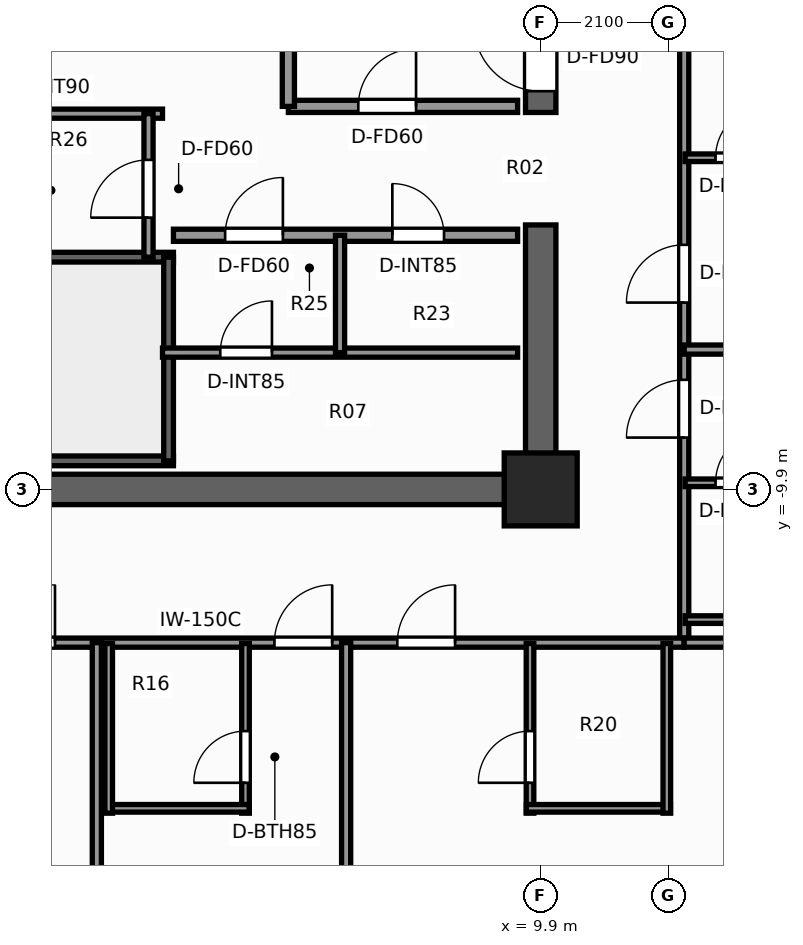
"""IFC4 building model, lengths in metres.
Left out: names, types, materials, properties, quantities, classifications, styles, units other than length and angle.
Written with IfcOpenShell. Run it as: python <this file> out.ifc"""

import sys

from ifc_helpers import new_model, si_unit, direction, frame, frame_2d, origin, origin_2d, place, context, subcontext, project, spatial, rectangle, extrude, element, fill, save


model = new_model("IFC4")
c1 = context("Model", 3, precision=1e-05, world=origin(), true_north=direction((0.0, 1.0)))
c2 = subcontext(c1, "Body", "Model", "MODEL_VIEW")
j1 = project(units=[si_unit("LENGTHUNIT", "METRE"), si_unit("PLANEANGLEUNIT", "RADIAN")], contexts=[c1])
p1 = place(None, origin())
s1 = spatial("IfcSite", under=j1, at=p1, CompositionType="ELEMENT")
p2 = place(p1, origin())
s2 = spatial("IfcBuilding", under=s1, at=p2, CompositionType="ELEMENT")
p3 = place(p2, frame((0.0, 0.0, 111.8)))
s3 = spatial("IfcBuildingStorey", under=s2, at=p3, CompositionType="ELEMENT", Elevation=111.8)
p4 = place(p3, frame((10.15, -9.9, 0.0), z_axis=(0.0, 0.0, 1.0), x_axis=(-1.0, 0.0, 0.0)))
e1 = element("IfcWall", 1, at=p4, inside=s3, PredefinedType="SHEAR", context=c2, shape_type="SweptSolid", body=[
    extrude(rectangle(XDim=12.01, YDim=0.5, at=frame_2d((6.005, 0.0))), origin(), (0.0, 0.0, 1.0), 3.3),
])
p5 = place(p3, frame((9.9, -9.65, 0.0), z_axis=(0.0, 0.0, 1.0), x_axis=(0.0, 1.0, 0.0)))
e2 = element("IfcWall", 2, at=p5, inside=s3, PredefinedType="SHEAR", context=c2, shape_type="SweptSolid", body=[
    extrude(rectangle(XDim=4.1, YDim=0.5, at=frame_2d((2.05, 0.0))), origin(), (0.0, 0.0, 1.0), 3.3),
])
p6 = place(p3, frame((9.9, -3.7, 0.0), z_axis=(0.0, 0.0, 1.0), x_axis=(0.0, 1.0, 0.0)))
e3 = element("IfcWall", 3, at=p6, inside=s3, PredefinedType="SHEAR", context=c2, shape_type="SweptSolid", body=[
    extrude(rectangle(XDim=13.35, YDim=0.5, at=frame_2d((6.675, 0.0))), origin(), (0.0, 0.0, 1.0), 3.3),
])
p7 = place(p6, frame((0.35, 0.0, 0.0)))
e4 = element("IfcOpeningElement", 4, at=p7, cuts=e3, PredefinedType="OPENING", context=c2, shape_type="SweptSolid", body=[
    extrude(rectangle(XDim=1.1, YDim=2.2, at=frame_2d((0.55, 1.1))), frame((0.0, 0.26, 0.0), z_axis=(0.0, -1.0, 0.0), x_axis=(1.0, 0.0, 0.0)), (0.0, 0.0, 1.0), 0.52),
])
p8 = place(p3, frame((9.9, -9.9, 0.0), z_axis=(0.0, 0.0, 1.0), x_axis=(1.0, 0.0, 0.0)))
e5 = element("IfcColumn", 5, at=p8, inside=s3, PredefinedType="COLUMN", context=c2, shape_type="SweptSolid", body=[
    extrude(rectangle(XDim=1.2, YDim=1.2, at=origin_2d()), origin(), (0.0, 0.0, 1.0), 3.3),
])
p9 = place(p3, frame((3.86, -9.43, 0.0), z_axis=(0.0, 0.0, 1.0), x_axis=(-1.0, 0.0, 0.0)))
e6 = element("IfcWall", 6, at=p9, inside=s3, PredefinedType="SHEAR", context=c2, shape_type="SweptSolid", body=[
    extrude(rectangle(XDim=7.72, YDim=0.16, at=frame_2d((3.86, 0.0))), origin(), (0.0, 0.0, 1.0), 3.3),
])
p10 = place(p9, frame((6.01, 0.0, 0.0)))
e7 = element("IfcOpeningElement", 7, at=p10, cuts=e6, PredefinedType="OPENING", context=c2, shape_type="SweptSolid", body=[
    extrude(rectangle(XDim=1.1, YDim=2.2, at=frame_2d((0.55, 1.1))), frame((0.0, 0.09, 0.0), z_axis=(0.0, -1.0, 0.0), x_axis=(1.0, 0.0, 0.0)), (0.0, 0.0, 1.0), 0.18),
])
p11 = place(p3, frame((-3.86, -6.08, 0.0), z_axis=(0.0, 0.0, 1.0), x_axis=(1.0, 0.0, 0.0)))
e8 = element("IfcWall", 8, at=p11, inside=s3, PredefinedType="SHEAR", context=c2, shape_type="SweptSolid", body=[
    extrude(rectangle(XDim=7.72, YDim=0.16, at=frame_2d((3.86, 0.0))), origin(), (0.0, 0.0, 1.0), 3.3),
])
p12 = place(p3, frame((3.78, -9.43, 0.0), z_axis=(0.0, 0.0, 1.0), x_axis=(0.0, 1.0, 0.0)))
e9 = element("IfcWall", 9, at=p12, inside=s3, PredefinedType="SHEAR", context=c2, shape_type="SweptSolid", body=[
    extrude(rectangle(XDim=3.35, YDim=0.16, at=frame_2d((1.675, 0.0))), origin(), (0.0, 0.0, 1.0), 3.3),
])
p13 = place(p3, frame((5.75, -3.6, 0.0), z_axis=(0.0, 0.0, 1.0), x_axis=(1.0, 0.0, 0.0)))
e10 = element("IfcWall", 10, at=p13, inside=s3, PredefinedType="SOLIDWALL", context=c2, shape_type="SweptSolid", body=[
    extrude(rectangle(XDim=3.77, YDim=0.2, at=frame_2d((1.885, 0.0))), origin(), (0.0, 0.0, 1.0), 3.08),
])
p14 = place(p13, frame((1.15, 0.0, 0.0)))
e11 = element("IfcOpeningElement", 11, at=p14, cuts=e10, PredefinedType="OPENING", context=c2, shape_type="SweptSolid", body=[
    extrude(rectangle(XDim=0.95, YDim=2.06, at=frame_2d((0.475, 1.03))), frame((0.0, 0.11, 0.0), z_axis=(0.0, -1.0, 0.0), x_axis=(1.0, 0.0, 0.0)), (0.0, 0.0, 1.0), 0.22),
])
p15 = place(p3, frame((5.75, -3.6, 0.0), z_axis=(0.0, 0.0, 1.0), x_axis=(0.0, 1.0, 0.0)))
e12 = element("IfcWall", 12, at=p15, inside=s3, PredefinedType="SOLIDWALL", context=c2, shape_type="SweptSolid", body=[
    extrude(rectangle(XDim=5.57, YDim=0.2, at=frame_2d((2.785, 0.0))), origin(), (0.0, 0.0, 1.0), 2.715),
])
p16 = place(p15, frame((2.75, 0.0, 0.0)))
e13 = element("IfcOpeningElement", 13, at=p16, cuts=e12, PredefinedType="OPENING", context=c2, shape_type="SweptSolid", body=[
    extrude(rectangle(XDim=1.1, YDim=2.2, at=frame_2d((0.55, 1.1))), frame((0.0, 0.11, 0.0), z_axis=(0.0, -1.0, 0.0), x_axis=(1.0, 0.0, 0.0)), (0.0, 0.0, 1.0), 0.22),
])
p17 = place(p3, frame((3.86, -5.72, 0.0), z_axis=(0.0, 0.0, 1.0), x_axis=(1.0, 0.0, 0.0)))
e14 = element("IfcWall", 14, at=p17, inside=s3, PredefinedType="SOLIDWALL", context=c2, shape_type="SweptSolid", body=[
    extrude(rectangle(XDim=5.66, YDim=0.2, at=frame_2d((2.83, 0.0))), origin(), (0.0, 0.0, 1.0), 3.08),
])
p18 = place(p17, frame((0.85, 0.0, 0.0)))
e15 = element("IfcOpeningElement", 15, at=p18, cuts=e14, PredefinedType="OPENING", context=c2, shape_type="SweptSolid", body=[
    extrude(rectangle(XDim=0.95, YDim=2.06, at=frame_2d((0.475, 1.03))), frame((0.0, 0.11, 0.0), z_axis=(0.0, -1.0, 0.0), x_axis=(1.0, 0.0, 0.0)), (0.0, 0.0, 1.0), 0.22),
])
p19 = place(p17, frame((3.6, 0.0, 0.0)))
e16 = element("IfcOpeningElement", 16, at=p19, cuts=e14, PredefinedType="OPENING", context=c2, shape_type="SweptSolid", body=[
    extrude(rectangle(XDim=0.85, YDim=2.03, at=frame_2d((0.425, 1.015))), frame((0.0, 0.11, 0.0), z_axis=(0.0, -1.0, 0.0), x_axis=(1.0, 0.0, 0.0)), (0.0, 0.0, 1.0), 0.22),
])
p20 = place(p3, frame((3.68, -7.65, 0.0), z_axis=(0.0, 0.0, 1.0), x_axis=(1.0, 0.0, 0.0)))
e17 = element("IfcWall", 17, at=p20, inside=s3, PredefinedType="PARTITIONING", context=c2, shape_type="SweptSolid", body=[
    extrude(rectangle(XDim=5.84, YDim=0.15, at=frame_2d((2.92, 0.0))), origin(), (0.0, 0.0, 1.0), 3.08),
])
p21 = place(p20, frame((0.95, 0.0, 0.0)))
e18 = element("IfcOpeningElement", 18, at=p21, cuts=e17, PredefinedType="OPENING", context=c2, shape_type="SweptSolid", body=[
    extrude(rectangle(XDim=0.85, YDim=2.03, at=frame_2d((0.425, 1.015))), frame((0.0, 0.085, 0.0), z_axis=(0.0, -1.0, 0.0), x_axis=(1.0, 0.0, 0.0)), (0.0, 0.0, 1.0), 0.17),
])
p22 = place(p3, frame((6.6, -7.65, 0.0), z_axis=(0.0, 0.0, 1.0), x_axis=(0.0, 1.0, 0.0)))
e19 = element("IfcWall", 19, at=p22, inside=s3, PredefinedType="PARTITIONING", context=c2, shape_type="SweptSolid", body=[
    extrude(rectangle(XDim=1.93, YDim=0.15, at=frame_2d((0.965, 0.0))), origin(), (0.0, 0.0, 1.0), 3.08),
])
p23 = place(p3, frame((-3.68, -3.72, 0.0), z_axis=(0.0, 0.0, 1.0), x_axis=(1.0, 0.0, 0.0)))
e20 = element("IfcWall", 20, at=p23, inside=s3, PredefinedType="PARTITIONING", context=c2, shape_type="SweptSolid", body=[
    extrude(rectangle(XDim=7.36, YDim=0.15, at=frame_2d((3.68, 0.0))), origin(), (0.0, 0.0, 1.0), 3.08),
])
p24 = place(p3, frame((3.45, -6.08, 0.0), z_axis=(0.0, 0.0, 1.0), x_axis=(0.0, 1.0, 0.0)))
e21 = element("IfcWall", 21, at=p24, inside=s3, PredefinedType="PARTITIONING", context=c2, shape_type="SweptSolid", body=[
    extrude(rectangle(XDim=2.36, YDim=0.15, at=frame_2d((1.18, 0.0))), origin(), (0.0, 0.0, 1.0), 3.08),
])
p25 = place(p24, frame((0.65, 0.0, 0.0)))
e22 = element("IfcOpeningElement", 22, at=p25, cuts=e21, PredefinedType="OPENING", context=c2, shape_type="SweptSolid", body=[
    extrude(rectangle(XDim=0.95, YDim=2.06, at=frame_2d((0.475, 1.03))), frame((0.0, 0.085, 0.0), z_axis=(0.0, -1.0, 0.0), x_axis=(1.0, 0.0, 0.0)), (0.0, 0.0, 1.0), 0.17),
])
p26 = place(p3, frame((12.26, -12.42, 0.0), z_axis=(0.0, 0.0, 1.0), x_axis=(0.0, 1.0, 0.0)))
e23 = element("IfcWall", 23, at=p26, inside=s3, PredefinedType="PARTITIONING", context=c2, shape_type="SweptSolid", body=[
    extrude(rectangle(XDim=24.84, YDim=0.15, at=frame_2d((12.42, 0.0))), origin(), (0.0, 0.0, 1.0), 2.292),
])
p27 = place(p26, frame((3.373, 0.0, 0.0)))
e24 = element("IfcOpeningElement", 24, at=p27, cuts=e23, PredefinedType="OPENING", context=c2, shape_type="SweptSolid", body=[
    extrude(rectangle(XDim=0.95, YDim=2.06, at=frame_2d((0.475, 1.03))), frame((0.0, 0.085, 0.0), z_axis=(0.0, -1.0, 0.0), x_axis=(1.0, 0.0, 0.0)), (0.0, 0.0, 1.0), 0.17),
])
p28 = place(p26, frame((5.593, 0.0, 0.0)))
e25 = element("IfcOpeningElement", 25, at=p28, cuts=e23, PredefinedType="OPENING", context=c2, shape_type="SweptSolid", body=[
    extrude(rectangle(XDim=0.95, YDim=2.06, at=frame_2d((0.475, 1.03))), frame((0.0, 0.085, 0.0), z_axis=(0.0, -1.0, 0.0), x_axis=(1.0, 0.0, 0.0)), (0.0, 0.0, 1.0), 0.17),
])
p29 = place(p26, frame((13.981, 0.0, 0.0)))
e26 = element("IfcOpeningElement", 26, at=p29, cuts=e23, PredefinedType="OPENING", context=c2, shape_type="SweptSolid", body=[
    extrude(rectangle(XDim=0.95, YDim=2.06, at=frame_2d((0.475, 1.03))), frame((0.0, 0.085, 0.0), z_axis=(0.0, -1.0, 0.0), x_axis=(1.0, 0.0, 0.0)), (0.0, 0.0, 1.0), 0.17),
])
p30 = place(p26, frame((16.886, 0.0, 0.0)))
e27 = element("IfcOpeningElement", 27, at=p30, cuts=e23, PredefinedType="OPENING", context=c2, shape_type="SweptSolid", body=[
    extrude(rectangle(XDim=0.9, YDim=2.06, at=frame_2d((0.45, 1.03))), frame((0.0, 0.085, 0.0), z_axis=(0.0, -1.0, 0.0), x_axis=(1.0, 0.0, 0.0)), (0.0, 0.0, 1.0), 0.17),
])
p31 = place(p26, frame((20.0, 0.0, 0.0)))
e28 = element("IfcOpeningElement", 28, at=p31, cuts=e23, PredefinedType="OPENING", context=c2, shape_type="SweptSolid", body=[
    extrude(rectangle(XDim=0.95, YDim=2.06, at=frame_2d((0.475, 1.03))), frame((0.0, 0.085, 0.0), z_axis=(0.0, -1.0, 0.0), x_axis=(1.0, 0.0, 0.0)), (0.0, 0.0, 1.0), 0.17),
])
p32 = place(p3, frame((-3.65, -12.42, 0.0), z_axis=(0.0, 0.0, 1.0), x_axis=(1.0, 0.0, 0.0)))
e29 = element("IfcWall", 29, at=p32, inside=s3, PredefinedType="PARTITIONING", context=c2, shape_type="SweptSolid", body=[
    extrude(rectangle(XDim=15.91, YDim=0.15, at=frame_2d((7.955, 0.0))), origin(), (0.0, 0.0, 1.0), 2.292),
])
p33 = place(p32, frame((4.612, 0.0, 0.0)))
e30 = element("IfcOpeningElement", 30, at=p33, cuts=e29, PredefinedType="OPENING", context=c2, shape_type="SweptSolid", body=[
    extrude(rectangle(XDim=0.95, YDim=2.06, at=frame_2d((0.475, 1.03))), frame((0.0, 0.085, 0.0), z_axis=(0.0, -1.0, 0.0), x_axis=(1.0, 0.0, 0.0)), (0.0, 0.0, 1.0), 0.17),
])
p34 = place(p32, frame((9.17, 0.0, 0.0)))
e31 = element("IfcOpeningElement", 31, at=p34, cuts=e29, PredefinedType="OPENING", context=c2, shape_type="SweptSolid", body=[
    extrude(rectangle(XDim=0.95, YDim=2.06, at=frame_2d((0.475, 1.03))), frame((0.0, 0.085, 0.0), z_axis=(0.0, -1.0, 0.0), x_axis=(1.0, 0.0, 0.0)), (0.0, 0.0, 1.0), 0.17),
])
p35 = place(p32, frame((11.192, 0.0, 0.0)))
e32 = element("IfcOpeningElement", 32, at=p35, cuts=e29, PredefinedType="OPENING", context=c2, shape_type="SweptSolid", body=[
    extrude(rectangle(XDim=0.95, YDim=2.06, at=frame_2d((0.475, 1.03))), frame((0.0, 0.085, 0.0), z_axis=(0.0, -1.0, 0.0), x_axis=(1.0, 0.0, 0.0)), (0.0, 0.0, 1.0), 0.17),
])
p36 = place(p3, frame((12.26, -12.42, 0.0), z_axis=(0.0, 0.0, 1.0), x_axis=(1.0, 0.0, 0.0)))
e33 = element("IfcWall", 33, at=p36, inside=s3, PredefinedType="PARTITIONING", context=c2, shape_type="SweptSolid", body=[
    extrude(rectangle(XDim=6.82, YDim=0.15, at=frame_2d((3.41, 0.0))), origin(), (0.0, 0.0, 1.0), 2.292),
])
p37 = place(p3, frame((12.26, -7.6, 0.0), z_axis=(0.0, 0.0, 1.0), x_axis=(1.0, 0.0, 0.0)))
e34 = element("IfcWall", 34, at=p37, inside=s3, PredefinedType="PARTITIONING", context=c2, shape_type="SweptSolid", body=[
    extrude(rectangle(XDim=6.82, YDim=0.15, at=frame_2d((3.41, 0.0))), origin(), (0.0, 0.0, 1.0), 2.449),
])
p38 = place(p3, frame((12.275, -9.791, 0.0), z_axis=(0.0, 0.0, 1.0), x_axis=(1.0, 0.0, 0.0)))
e35 = element("IfcWall", 35, at=p38, inside=s3, PredefinedType="PARTITIONING", context=c2, shape_type="SweptSolid", body=[
    extrude(rectangle(XDim=2.79, YDim=0.125, at=frame_2d((1.395, 0.0))), origin(), (0.0, 0.0, 1.0), 3.08),
])
p39 = place(p38, frame((0.5, 0.0, 0.0)))
e36 = element("IfcOpeningElement", 36, at=p39, cuts=e35, PredefinedType="OPENING", context=c2, shape_type="SweptSolid", body=[
    extrude(rectangle(XDim=0.85, YDim=2.03, at=frame_2d((0.425, 1.015))), frame((0.0, 0.073, 0.0), z_axis=(0.0, -1.0, 0.0), x_axis=(1.0, 0.0, 0.0)), (0.0, 0.0, 1.0), 0.145),
])
p40 = place(p3, frame((12.275, -12.041, 0.0), z_axis=(0.0, 0.0, 1.0), x_axis=(1.0, 0.0, 0.0)))
e37 = element("IfcWall", 37, at=p40, inside=s3, PredefinedType="PARTITIONING", context=c2, shape_type="SweptSolid", body=[
    extrude(rectangle(XDim=2.79, YDim=0.125, at=frame_2d((1.395, 0.0))), origin(), (0.0, 0.0, 1.0), 3.08),
])
p41 = place(p3, frame((12.275, -4.445, 0.0), z_axis=(0.0, 0.0, 1.0), x_axis=(1.0, 0.0, 0.0)))
e38 = element("IfcWall", 38, at=p41, inside=s3, PredefinedType="PARTITIONING", context=c2, shape_type="SweptSolid", body=[
    extrude(rectangle(XDim=2.79, YDim=0.125, at=frame_2d((1.395, 0.0))), origin(), (0.0, 0.0, 1.0), 2.292),
])
p42 = place(p41, frame((0.5, 0.0, 0.0)))
e39 = element("IfcOpeningElement", 39, at=p42, cuts=e38, PredefinedType="OPENING", context=c2, shape_type="SweptSolid", body=[
    extrude(rectangle(XDim=0.85, YDim=2.03, at=frame_2d((0.425, 1.015))), frame((0.0, 0.073, 0.0), z_axis=(0.0, -1.0, 0.0), x_axis=(1.0, 0.0, 0.0)), (0.0, 0.0, 1.0), 0.145),
])
for number, where, z_axis, x_axis in (
    (40, (2.6, -19.08, 0.0), (0.0, 0.0, 1.0), (0.0, 1.0, 0.0)),
    (41, (6.7, -19.08, 0.0), (0.0, 0.0, 1.0), (0.0, 1.0, 0.0)),
):
    element("IfcWall", number, at=place(p3, frame(where, z_axis=z_axis, x_axis=x_axis)), inside=s3, PredefinedType="PARTITIONING", context=c2, shape_type="SweptSolid", body=[
        extrude(rectangle(XDim=6.66, YDim=0.15, at=frame_2d((3.33, 0.0))), origin(), (0.0, 0.0, 1.0), 2.449),
    ])
p43 = place(p3, frame((5.045, -15.225, 0.0), z_axis=(0.0, 0.0, 1.0), x_axis=(0.0, 1.0, 0.0)))
e42 = element("IfcWall", 42, at=p43, inside=s3, PredefinedType="PARTITIONING", context=c2, shape_type="SweptSolid", body=[
    extrude(rectangle(XDim=2.79, YDim=0.125, at=frame_2d((1.395, 0.0))), origin(), (0.0, 0.0, 1.0), 3.08),
])
p44 = place(p43, frame((0.5, 0.0, 0.0)))
e43 = element("IfcOpeningElement", 43, at=p44, cuts=e42, PredefinedType="OPENING", context=c2, shape_type="SweptSolid", body=[
    extrude(rectangle(XDim=0.85, YDim=2.03, at=frame_2d((0.425, 1.015))), frame((0.0, 0.073, 0.0), z_axis=(0.0, -1.0, 0.0), x_axis=(1.0, 0.0, 0.0)), (0.0, 0.0, 1.0), 0.145),
])
p45 = place(p3, frame((2.735, -15.145, 0.0), z_axis=(0.0, 0.0, 1.0), x_axis=(1.0, 0.0, 0.0)))
e44 = element("IfcWall", 44, at=p45, inside=s3, PredefinedType="PARTITIONING", context=c2, shape_type="SweptSolid", body=[
    extrude(rectangle(XDim=2.37, YDim=0.125, at=frame_2d((1.185, 0.0))), origin(), (0.0, 0.0, 1.0), 2.292),
])
p46 = place(p3, frame((2.795, -15.225, 0.0), z_axis=(0.0, 0.0, 1.0), x_axis=(0.0, 1.0, 0.0)))
e45 = element("IfcWall", 45, at=p46, inside=s3, PredefinedType="PARTITIONING", context=c2, shape_type="SweptSolid", body=[
    extrude(rectangle(XDim=2.79, YDim=0.125, at=frame_2d((1.395, 0.0))), origin(), (0.0, 0.0, 1.0), 3.08),
])
p47 = place(p3, frame((9.724, -15.225, 0.0), z_axis=(0.0, 0.0, 1.0), x_axis=(0.0, 1.0, 0.0)))
e46 = element("IfcWall", 46, at=p47, inside=s3, PredefinedType="PARTITIONING", context=c2, shape_type="SweptSolid", body=[
    extrude(rectangle(XDim=2.79, YDim=0.125, at=frame_2d((1.395, 0.0))), origin(), (0.0, 0.0, 1.0), 3.08),
])
p48 = place(p47, frame((0.5, 0.0, 0.0)))
e47 = element("IfcOpeningElement", 47, at=p48, cuts=e46, PredefinedType="OPENING", context=c2, shape_type="SweptSolid", body=[
    extrude(rectangle(XDim=0.85, YDim=2.03, at=frame_2d((0.425, 1.015))), frame((0.0, 0.073, 0.0), z_axis=(0.0, -1.0, 0.0), x_axis=(1.0, 0.0, 0.0)), (0.0, 0.0, 1.0), 0.145),
])
p49 = place(p3, frame((9.664, -15.145, 0.0), z_axis=(0.0, 0.0, 1.0), x_axis=(1.0, 0.0, 0.0)))
e48 = element("IfcWall", 48, at=p49, inside=s3, PredefinedType="PARTITIONING", context=c2, shape_type="SweptSolid", body=[
    extrude(rectangle(XDim=2.37, YDim=0.125, at=frame_2d((1.185, 0.0))), origin(), (0.0, 0.0, 1.0), 2.292),
])
p50 = place(p3, frame((11.974, -15.225, 0.0), z_axis=(0.0, 0.0, 1.0), x_axis=(0.0, 1.0, 0.0)))
e49 = element("IfcWall", 49, at=p50, inside=s3, PredefinedType="PARTITIONING", context=c2, shape_type="SweptSolid", body=[
    extrude(rectangle(XDim=2.79, YDim=0.125, at=frame_2d((1.395, 0.0))), origin(), (0.0, 0.0, 1.0), 3.08),
])
p51 = place(p7, origin())
e50 = element("IfcDoor", 50, at=p51, inside=s3, OperationType="SINGLE_SWING_RIGHT", PredefinedType="DOOR", context=c2, shape_type="SweptSolid", body=[
    extrude(rectangle(XDim=1.1, YDim=2.2, at=frame_2d((0.55, 1.1))), frame((0.0, 0.025, 0.0), z_axis=(0.0, -1.0, 0.0), x_axis=(1.0, 0.0, 0.0)), (0.0, 0.0, 1.0), 0.05),
])
fill(e4, e50)
p52 = place(p18, origin())
e51 = element("IfcDoor", 51, at=p52, inside=s3, OperationType="SINGLE_SWING_RIGHT", PredefinedType="DOOR", context=c2, shape_type="SweptSolid", body=[
    extrude(rectangle(XDim=0.95, YDim=2.06, at=frame_2d((0.475, 1.03))), frame((0.0, 0.025, 0.0), z_axis=(0.0, -1.0, 0.0), x_axis=(1.0, 0.0, 0.0)), (0.0, 0.0, 1.0), 0.05),
])
fill(e15, e51)
p53 = place(p19, origin())
e52 = element("IfcDoor", 52, at=p53, inside=s3, OperationType="SINGLE_SWING_LEFT", PredefinedType="DOOR", context=c2, shape_type="SweptSolid", body=[
    extrude(rectangle(XDim=0.85, YDim=2.03, at=frame_2d((0.425, 1.015))), frame((0.0, 0.025, 0.0), z_axis=(0.0, -1.0, 0.0), x_axis=(1.0, 0.0, 0.0)), (0.0, 0.0, 1.0), 0.05),
])
fill(e16, e52)
p54 = place(p21, origin())
e53 = element("IfcDoor", 53, at=p54, inside=s3, OperationType="SINGLE_SWING_RIGHT", PredefinedType="DOOR", context=c2, shape_type="SweptSolid", body=[
    extrude(rectangle(XDim=0.85, YDim=2.03, at=frame_2d((0.425, 1.015))), frame((0.0, 0.025, 0.0), z_axis=(0.0, -1.0, 0.0), x_axis=(1.0, 0.0, 0.0)), (0.0, 0.0, 1.0), 0.05),
])
fill(e18, e53)
p55 = place(p14, origin())
e54 = element("IfcDoor", 54, at=p55, inside=s3, OperationType="SINGLE_SWING_RIGHT", PredefinedType="DOOR", context=c2, shape_type="SweptSolid", body=[
    extrude(rectangle(XDim=0.95, YDim=2.06, at=frame_2d((0.475, 1.03))), frame((0.0, 0.025, 0.0), z_axis=(0.0, -1.0, 0.0), x_axis=(1.0, 0.0, 0.0)), (0.0, 0.0, 1.0), 0.05),
])
fill(e11, e54)
p56 = place(p25, origin())
e55 = element("IfcDoor", 55, at=p56, inside=s3, OperationType="SINGLE_SWING_LEFT", PredefinedType="DOOR", context=c2, shape_type="SweptSolid", body=[
    extrude(rectangle(XDim=0.95, YDim=2.06, at=frame_2d((0.475, 1.03))), frame((0.0, 0.025, 0.0), z_axis=(0.0, -1.0, 0.0), x_axis=(1.0, 0.0, 0.0)), (0.0, 0.0, 1.0), 0.05),
])
fill(e22, e55)
p57 = place(p39, origin())
e56 = element("IfcDoor", 56, at=p57, inside=s3, OperationType="SINGLE_SWING_RIGHT", PredefinedType="DOOR", context=c2, shape_type="SweptSolid", body=[
    extrude(rectangle(XDim=0.85, YDim=2.03, at=frame_2d((0.425, 1.015))), frame((0.0, 0.025, 0.0), z_axis=(0.0, -1.0, 0.0), x_axis=(1.0, 0.0, 0.0)), (0.0, 0.0, 1.0), 0.05),
])
fill(e36, e56)
p58 = place(p27, origin())
e57 = element("IfcDoor", 57, at=p58, inside=s3, OperationType="SINGLE_SWING_LEFT", PredefinedType="DOOR", context=c2, shape_type="SweptSolid", body=[
    extrude(rectangle(XDim=0.95, YDim=2.06, at=frame_2d((0.475, 1.03))), frame((0.0, 0.025, 0.0), z_axis=(0.0, -1.0, 0.0), x_axis=(1.0, 0.0, 0.0)), (0.0, 0.0, 1.0), 0.05),
])
fill(e24, e57)
p59 = place(p42, origin())
e58 = element("IfcDoor", 58, at=p59, inside=s3, OperationType="SINGLE_SWING_RIGHT", PredefinedType="DOOR", context=c2, shape_type="SweptSolid", body=[
    extrude(rectangle(XDim=0.85, YDim=2.03, at=frame_2d((0.425, 1.015))), frame((0.0, 0.025, 0.0), z_axis=(0.0, -1.0, 0.0), x_axis=(1.0, 0.0, 0.0)), (0.0, 0.0, 1.0), 0.05),
])
fill(e39, e58)
p60 = place(p28, origin())
e59 = element("IfcDoor", 59, at=p60, inside=s3, OperationType="SINGLE_SWING_LEFT", PredefinedType="DOOR", context=c2, shape_type="SweptSolid", body=[
    extrude(rectangle(XDim=0.95, YDim=2.06, at=frame_2d((0.475, 1.03))), frame((0.0, 0.025, 0.0), z_axis=(0.0, -1.0, 0.0), x_axis=(1.0, 0.0, 0.0)), (0.0, 0.0, 1.0), 0.05),
])
fill(e25, e59)
p61 = place(p33, origin())
e60 = element("IfcDoor", 60, at=p61, inside=s3, OperationType="SINGLE_SWING_RIGHT", PredefinedType="DOOR", context=c2, shape_type="SweptSolid", body=[
    extrude(rectangle(XDim=0.95, YDim=2.06, at=frame_2d((0.475, 1.03))), frame((0.0, 0.025, 0.0), z_axis=(0.0, -1.0, 0.0), x_axis=(1.0, 0.0, 0.0)), (0.0, 0.0, 1.0), 0.05),
])
fill(e30, e60)
p62 = place(p44, origin())
e61 = element("IfcDoor", 61, at=p62, inside=s3, OperationType="SINGLE_SWING_LEFT", PredefinedType="DOOR", context=c2, shape_type="SweptSolid", body=[
    extrude(rectangle(XDim=0.85, YDim=2.03, at=frame_2d((0.425, 1.015))), frame((0.0, 0.025, 0.0), z_axis=(0.0, -1.0, 0.0), x_axis=(1.0, 0.0, 0.0)), (0.0, 0.0, 1.0), 0.05),
])
fill(e43, e61)
p63 = place(p34, origin())
e62 = element("IfcDoor", 62, at=p63, inside=s3, OperationType="SINGLE_SWING_RIGHT", PredefinedType="DOOR", context=c2, shape_type="SweptSolid", body=[
    extrude(rectangle(XDim=0.95, YDim=2.06, at=frame_2d((0.475, 1.03))), frame((0.0, 0.025, 0.0), z_axis=(0.0, -1.0, 0.0), x_axis=(1.0, 0.0, 0.0)), (0.0, 0.0, 1.0), 0.05),
])
fill(e31, e62)
p64 = place(p48, origin())
e63 = element("IfcDoor", 63, at=p64, inside=s3, OperationType="SINGLE_SWING_LEFT", PredefinedType="DOOR", context=c2, shape_type="SweptSolid", body=[
    extrude(rectangle(XDim=0.85, YDim=2.03, at=frame_2d((0.425, 1.015))), frame((0.0, 0.025, 0.0), z_axis=(0.0, -1.0, 0.0), x_axis=(1.0, 0.0, 0.0)), (0.0, 0.0, 1.0), 0.05),
])
fill(e47, e63)
p65 = place(p35, origin())
e64 = element("IfcDoor", 64, at=p65, inside=s3, OperationType="SINGLE_SWING_RIGHT", PredefinedType="DOOR", context=c2, shape_type="SweptSolid", body=[
    extrude(rectangle(XDim=0.95, YDim=2.06, at=frame_2d((0.475, 1.03))), frame((0.0, 0.025, 0.0), z_axis=(0.0, -1.0, 0.0), x_axis=(1.0, 0.0, 0.0)), (0.0, 0.0, 1.0), 0.05),
])
fill(e32, e64)
save(model, sys.argv[1])
